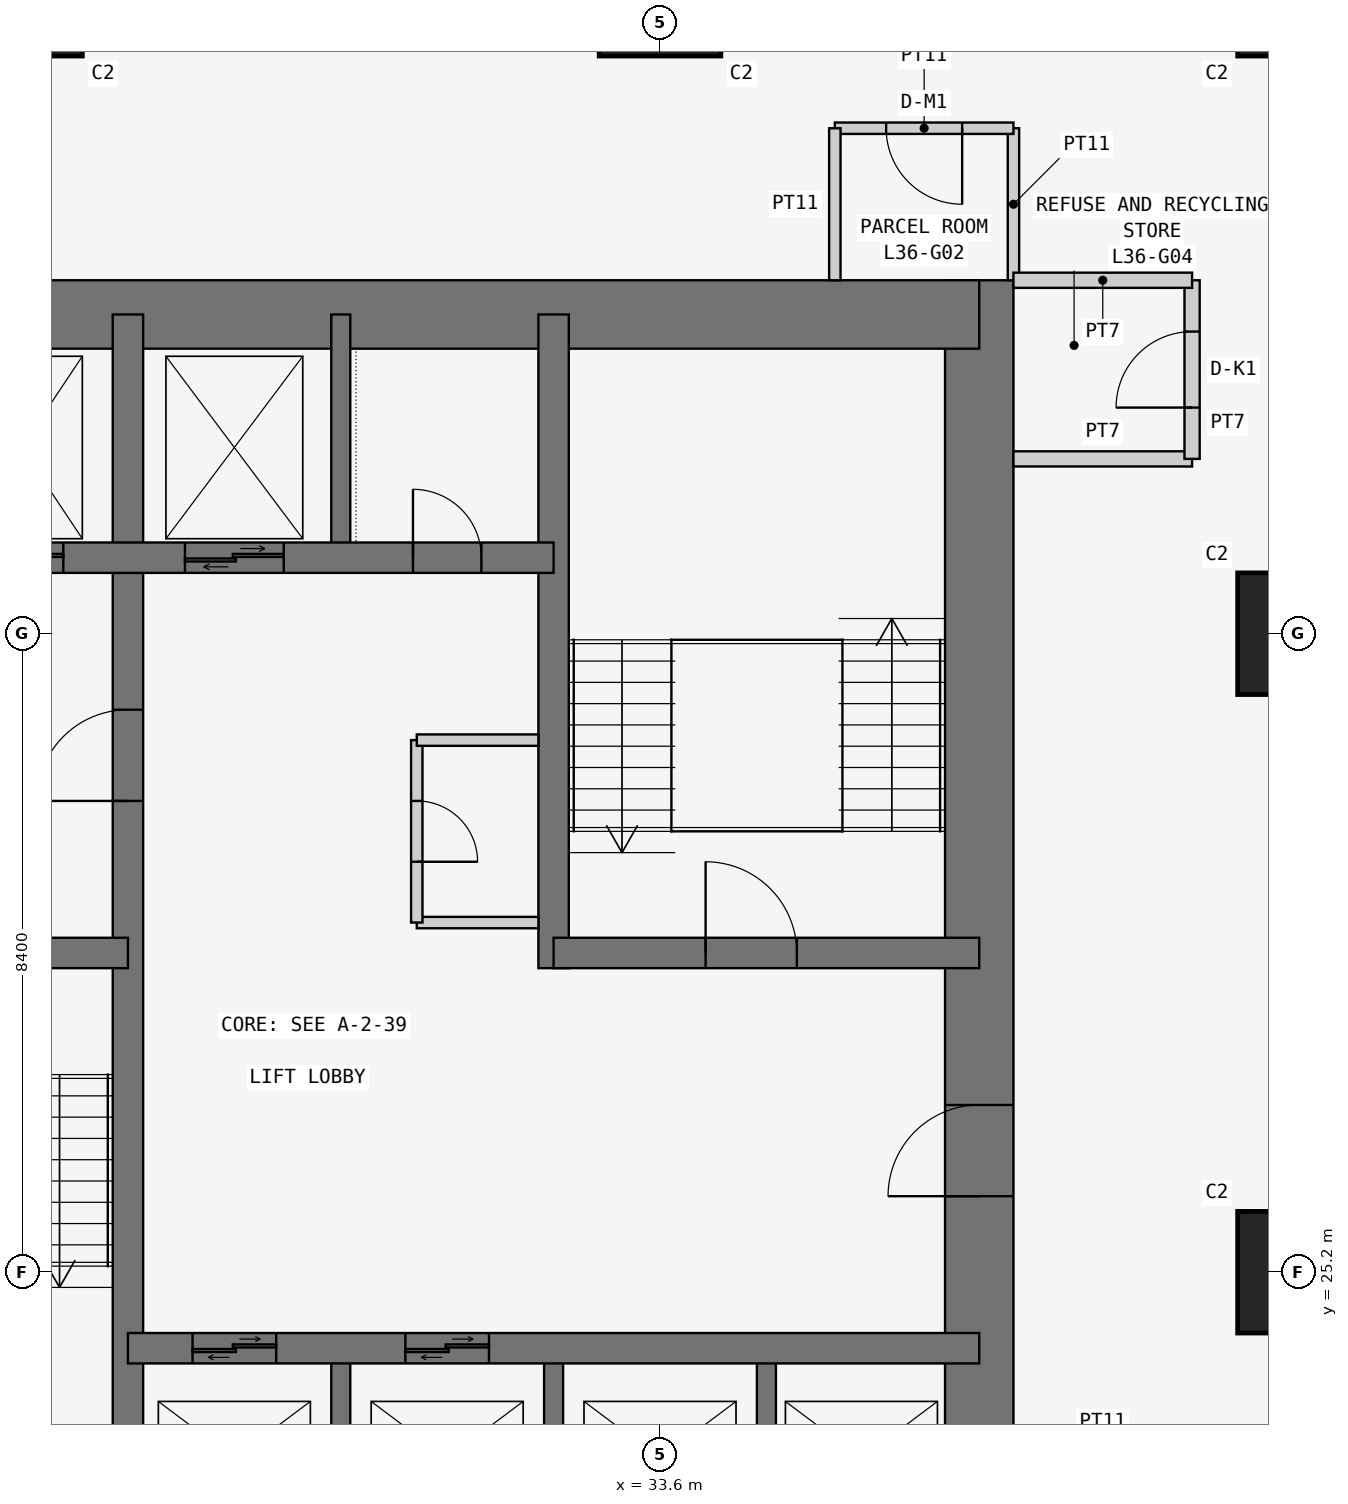
"""IFC4 building model, lengths in metres.
Left out: names, types, materials, properties, quantities, classifications, styles, units other than length and angle.
Written with IfcOpenShell. Run it as: python <this file> out.ifc"""

import sys

from ifc_helpers import new_model, si_unit, direction, frame, frame_2d, origin, origin_2d, place, context, subcontext, project, spatial, rectangle, extrude, element, fill, save


model = new_model("IFC4")
c1 = context("Model", 3, precision=1e-05, world=origin(), true_north=direction((0.0, 1.0)))
c2 = subcontext(c1, "Body", "Model", "MODEL_VIEW")
j1 = project(units=[si_unit("LENGTHUNIT", "METRE"), si_unit("PLANEANGLEUNIT", "RADIAN")], contexts=[c1])
p1 = place(None, origin())
s1 = spatial("IfcSite", under=j1, at=p1, CompositionType="ELEMENT")
p2 = place(p1, origin())
s2 = spatial("IfcBuilding", under=s1, at=p2, CompositionType="ELEMENT")
p3 = place(p2, frame((0.0, 0.0, 141.3)))
s3 = spatial("IfcBuildingStorey", under=s2, at=p3, CompositionType="ELEMENT", Elevation=141.3)
for number, where, z_axis, x_axis in (
    (1, (25.2, 42.0, 0.0), (0.0, 0.0, 1.0), (1.0, 0.0, 0.0)),
    (2, (33.6, 42.0, 0.0), (0.0, 0.0, 1.0), (1.0, 0.0, 0.0)),
    (3, (42.0, 25.2, 0.0), (0.0, 0.0, 1.0), (1.0, 0.0, 0.0)),
    (4, (42.0, 33.6, 0.0), (0.0, 0.0, 1.0), (1.0, 0.0, 0.0)),
    (5, (42.0, 42.0, 0.0), (0.0, 0.0, 1.0), (1.0, 0.0, 0.0)),
):
    element("IfcColumn", number, at=place(p3, frame(where, z_axis=z_axis, x_axis=x_axis)), inside=s3, PredefinedType="COLUMN", context=c2, shape_type="SweptSolid", body=[
        extrude(rectangle(XDim=1.6, YDim=1.6, at=origin_2d()), origin(), (0.0, 0.0, 1.0), 3.6),
    ])
p4 = place(p3, frame((37.8, 21.0, 0.0), z_axis=(0.0, 0.0, 1.0), x_axis=(0.0, 1.0, 0.0)))
e6 = element("IfcWall", 6, at=p4, inside=s3, PredefinedType="SHEAR", context=c2, shape_type="SweptSolid", body=[
    extrude(rectangle(XDim=17.25, YDim=0.9, at=frame_2d((8.625, 0.0))), origin(), (0.0, 0.0, 1.0), 3.6),
])
p5 = place(p4, frame((5.2, 0.0, 0.0)))
e7 = element("IfcOpeningElement", 7, at=p5, cuts=e6, PredefinedType="OPENING", context=c2, shape_type="SweptSolid", body=[
    extrude(rectangle(XDim=1.2, YDim=2.1, at=frame_2d((0.6, 1.05))), frame((0.0, 0.46, 0.0), z_axis=(0.0, -1.0, 0.0), x_axis=(1.0, 0.0, 0.0)), (0.0, 0.0, 1.0), 0.92),
])
p6 = place(p3, frame((37.8, 37.8, 0.0), z_axis=(0.0, 0.0, 1.0), x_axis=(-1.0, 0.0, 0.0)))
e8 = element("IfcWall", 8, at=p6, inside=s3, PredefinedType="SHEAR", context=c2, shape_type="SweptSolid", body=[
    extrude(rectangle(XDim=17.25, YDim=0.9, at=frame_2d((8.625, 0.0))), origin(), (0.0, 0.0, 1.0), 3.6),
])
p7 = place(p3, frame((26.6, 21.0, 0.0), z_axis=(0.0, 0.0, 1.0), x_axis=(0.0, 1.0, 0.0)))
e9 = element("IfcWall", 9, at=p7, inside=s3, PredefinedType="SHEAR", context=c2, shape_type="SweptSolid", body=[
    extrude(rectangle(XDim=16.8, YDim=0.4, at=frame_2d((8.4, 0.0))), origin(), (0.0, 0.0, 1.0), 3.6),
])
p8 = place(p7, frame((10.4, 0.0, 0.0)))
e10 = element("IfcOpeningElement", 10, at=p8, cuts=e9, PredefinedType="OPENING", context=c2, shape_type="SweptSolid", body=[
    extrude(rectangle(XDim=1.2, YDim=2.1, at=frame_2d((0.6, 1.05))), frame((0.0, 0.21, 0.0), z_axis=(0.0, -1.0, 0.0), x_axis=(1.0, 0.0, 0.0)), (0.0, 0.0, 1.0), 0.42),
])
p9 = place(p3, frame((21.0, 29.4, 0.0), z_axis=(0.0, 0.0, 1.0), x_axis=(1.0, 0.0, 0.0)))
e11 = element("IfcWall", 11, at=p9, inside=s3, PredefinedType="SHEAR", context=c2, shape_type="SweptSolid", body=[
    extrude(rectangle(XDim=5.6, YDim=0.4, at=frame_2d((2.8, 0.0))), origin(), (0.0, 0.0, 1.0), 3.6),
])
p10 = place(p9, frame((2.3, 0.0, 0.0)))
e12 = element("IfcOpeningElement", 12, at=p10, cuts=e11, PredefinedType="OPENING", context=c2, shape_type="SweptSolid", body=[
    extrude(rectangle(XDim=1.2, YDim=2.1, at=frame_2d((0.6, 1.05))), frame((0.0, 0.21, 0.0), z_axis=(0.0, -1.0, 0.0), x_axis=(1.0, 0.0, 0.0)), (0.0, 0.0, 1.0), 0.42),
])
p11 = place(p3, frame((21.0, 34.6, 0.0), z_axis=(0.0, 0.0, 1.0), x_axis=(1.0, 0.0, 0.0)))
e13 = element("IfcWall", 13, at=p11, inside=s3, PredefinedType="SHEAR", context=c2, shape_type="SweptSolid", body=[
    extrude(rectangle(XDim=11.2, YDim=0.4, at=frame_2d((5.6, 0.0))), origin(), (0.0, 0.0, 1.0), 3.6),
])
p12 = place(p11, frame((9.35, 0.0, 0.0)))
e14 = element("IfcOpeningElement", 14, at=p12, cuts=e13, PredefinedType="OPENING", context=c2, shape_type="SweptSolid", body=[
    extrude(rectangle(XDim=0.9, YDim=2.1, at=frame_2d((0.45, 1.05))), frame((0.0, 0.21, 0.0), z_axis=(0.0, -1.0, 0.0), x_axis=(1.0, 0.0, 0.0)), (0.0, 0.0, 1.0), 0.42),
])
p13 = place(p11, frame((1.0, 0.0, 0.0)))
e15 = element("IfcOpeningElement", 15, at=p13, cuts=e13, PredefinedType="OPENING", context=c2, shape_type="SweptSolid", body=[
    extrude(rectangle(XDim=1.1, YDim=2.1, at=frame_2d((0.55, 1.05))), frame((0.0, 0.21, 0.0), z_axis=(0.0, -1.0, 0.0), x_axis=(1.0, 0.0, 0.0)), (0.0, 0.0, 1.0), 0.42),
])
p14 = place(p11, frame((3.65, 0.0, 0.0)))
e16 = element("IfcOpeningElement", 16, at=p14, cuts=e13, PredefinedType="OPENING", context=c2, shape_type="SweptSolid", body=[
    extrude(rectangle(XDim=1.1, YDim=2.1, at=frame_2d((0.55, 1.05))), frame((0.0, 0.21, 0.0), z_axis=(0.0, -1.0, 0.0), x_axis=(1.0, 0.0, 0.0)), (0.0, 0.0, 1.0), 0.42),
])
p15 = place(p11, frame((6.35, 0.0, 0.0)))
e17 = element("IfcOpeningElement", 17, at=p15, cuts=e13, PredefinedType="OPENING", context=c2, shape_type="SweptSolid", body=[
    extrude(rectangle(XDim=1.3, YDim=2.1, at=frame_2d((0.65, 1.05))), frame((0.0, 0.21, 0.0), z_axis=(0.0, -1.0, 0.0), x_axis=(1.0, 0.0, 0.0)), (0.0, 0.0, 1.0), 0.42),
])
p16 = place(p3, frame((26.6, 24.2, 0.0), z_axis=(0.0, 0.0, 1.0), x_axis=(1.0, 0.0, 0.0)))
e18 = element("IfcWall", 18, at=p16, inside=s3, PredefinedType="SHEAR", context=c2, shape_type="SweptSolid", body=[
    extrude(rectangle(XDim=11.2, YDim=0.4, at=frame_2d((5.6, 0.0))), origin(), (0.0, 0.0, 1.0), 3.6),
])
p17 = place(p16, frame((0.85, 0.0, 0.0)))
e19 = element("IfcOpeningElement", 19, at=p17, cuts=e18, PredefinedType="OPENING", context=c2, shape_type="SweptSolid", body=[
    extrude(rectangle(XDim=1.1, YDim=2.1, at=frame_2d((0.55, 1.05))), frame((0.0, 0.21, 0.0), z_axis=(0.0, -1.0, 0.0), x_axis=(1.0, 0.0, 0.0)), (0.0, 0.0, 1.0), 0.42),
])
p18 = place(p16, frame((3.65, 0.0, 0.0)))
e20 = element("IfcOpeningElement", 20, at=p18, cuts=e18, PredefinedType="OPENING", context=c2, shape_type="SweptSolid", body=[
    extrude(rectangle(XDim=1.1, YDim=2.1, at=frame_2d((0.55, 1.05))), frame((0.0, 0.21, 0.0), z_axis=(0.0, -1.0, 0.0), x_axis=(1.0, 0.0, 0.0)), (0.0, 0.0, 1.0), 0.42),
])
p19 = place(p3, frame((32.2, 29.2, 0.0), z_axis=(0.0, 0.0, 1.0), x_axis=(0.0, 1.0, 0.0)))
e21 = element("IfcWall", 21, at=p19, inside=s3, PredefinedType="SHEAR", context=c2, shape_type="SweptSolid", body=[
    extrude(rectangle(XDim=8.6, YDim=0.4, at=frame_2d((4.3, 0.0))), origin(), (0.0, 0.0, 1.0), 3.6),
])
p20 = place(p3, frame((32.2, 29.4, 0.0), z_axis=(0.0, 0.0, 1.0), x_axis=(1.0, 0.0, 0.0)))
e22 = element("IfcWall", 22, at=p20, inside=s3, PredefinedType="SHEAR", context=c2, shape_type="SweptSolid", body=[
    extrude(rectangle(XDim=5.6, YDim=0.4, at=frame_2d((2.8, 0.0))), origin(), (0.0, 0.0, 1.0), 3.6),
])
p21 = place(p20, frame((2.0, 0.0, 0.0)))
e23 = element("IfcOpeningElement", 23, at=p21, cuts=e22, PredefinedType="OPENING", context=c2, shape_type="SweptSolid", body=[
    extrude(rectangle(XDim=1.2, YDim=2.1, at=frame_2d((0.6, 1.05))), frame((0.0, 0.21, 0.0), z_axis=(0.0, -1.0, 0.0), x_axis=(1.0, 0.0, 0.0)), (0.0, 0.0, 1.0), 0.42),
])
for number, where, z_axis, x_axis in (
    (24, (29.4, 21.0, 0.0), (0.0, 0.0, 1.0), (0.0, 1.0, 0.0)),
    (25, (32.2, 21.0, 0.0), (0.0, 0.0, 1.0), (0.0, 1.0, 0.0)),
    (26, (35.0, 21.0, 0.0), (0.0, 0.0, 1.0), (0.0, 1.0, 0.0)),
    (27, (29.4, 34.6, 0.0), (0.0, 0.0, 1.0), (0.0, 1.0, 0.0)),
):
    element("IfcWall", number, at=place(p3, frame(where, z_axis=z_axis, x_axis=x_axis)), inside=s3, PredefinedType="SHEAR", context=c2, shape_type="SweptSolid", body=[
        extrude(rectangle(XDim=3.2, YDim=0.25, at=frame_2d((1.6, 0.0))), origin(), (0.0, 0.0, 1.0), 3.6),
    ])
p22 = place(p3, frame((38.25, 38.25, 0.0), z_axis=(0.0, 0.0, 1.0), x_axis=(0.0, 1.0, 0.0)))
e28 = element("IfcWall", 28, at=p22, inside=s3, PredefinedType="PARTITIONING", context=c2, shape_type="SweptSolid", body=[
    extrude(rectangle(XDim=2.0, YDim=0.15, at=frame_2d((1.0, 0.0))), origin(), (0.0, 0.0, 1.0), 3.45),
])
p23 = place(p3, frame((38.25, 40.25, 0.0), z_axis=(0.0, 0.0, 1.0), x_axis=(-1.0, 0.0, 0.0)))
e29 = element("IfcWall", 29, at=p23, inside=s3, PredefinedType="PARTITIONING", context=c2, shape_type="SweptSolid", body=[
    extrude(rectangle(XDim=2.35, YDim=0.15, at=frame_2d((1.175, 0.0))), origin(), (0.0, 0.0, 1.0), 3.45),
])
p24 = place(p23, frame((0.675, 0.0, 0.0)))
e30 = element("IfcOpeningElement", 30, at=p24, cuts=e29, PredefinedType="OPENING", context=c2, shape_type="SweptSolid", body=[
    extrude(rectangle(XDim=1.0, YDim=2.1, at=frame_2d((0.5, 1.05))), frame((0.0, 0.085, 0.0), z_axis=(0.0, -1.0, 0.0), x_axis=(1.0, 0.0, 0.0)), (0.0, 0.0, 1.0), 0.17),
])
p25 = place(p3, frame((35.9, 40.25, 0.0), z_axis=(0.0, 0.0, 1.0), x_axis=(0.0, -1.0, 0.0)))
e31 = element("IfcWall", 31, at=p25, inside=s3, PredefinedType="PARTITIONING", context=c2, shape_type="SweptSolid", body=[
    extrude(rectangle(XDim=2.0, YDim=0.15, at=frame_2d((1.0, 0.0))), origin(), (0.0, 0.0, 1.0), 3.45),
])
p26 = place(p3, frame((38.25, 35.9, 0.0), z_axis=(0.0, 0.0, 1.0), x_axis=(1.0, 0.0, 0.0)))
e32 = element("IfcWall", 32, at=p26, inside=s3, PredefinedType="PARTITIONING", context=c2, shape_type="SweptSolid", body=[
    extrude(rectangle(XDim=2.35, YDim=0.2, at=frame_2d((1.175, 0.0))), origin(), (0.0, 0.0, 1.0), 3.45),
])
p27 = place(p3, frame((40.6, 35.9, 0.0), z_axis=(0.0, 0.0, 1.0), x_axis=(0.0, 1.0, 0.0)))
e33 = element("IfcWall", 33, at=p27, inside=s3, PredefinedType="PARTITIONING", context=c2, shape_type="SweptSolid", body=[
    extrude(rectangle(XDim=2.35, YDim=0.2, at=frame_2d((1.175, 0.0))), origin(), (0.0, 0.0, 1.0), 3.45),
])
p28 = place(p27, frame((0.675, 0.0, 0.0)))
e34 = element("IfcOpeningElement", 34, at=p28, cuts=e33, PredefinedType="OPENING", context=c2, shape_type="SweptSolid", body=[
    extrude(rectangle(XDim=1.0, YDim=2.1, at=frame_2d((0.5, 1.05))), frame((0.0, 0.11, 0.0), z_axis=(0.0, -1.0, 0.0), x_axis=(1.0, 0.0, 0.0)), (0.0, 0.0, 1.0), 0.22),
])
p29 = place(p3, frame((40.6, 38.25, 0.0), z_axis=(0.0, 0.0, 1.0), x_axis=(-1.0, 0.0, 0.0)))
e35 = element("IfcWall", 35, at=p29, inside=s3, PredefinedType="PARTITIONING", context=c2, shape_type="SweptSolid", body=[
    extrude(rectangle(XDim=2.35, YDim=0.2, at=frame_2d((1.175, 0.0))), origin(), (0.0, 0.0, 1.0), 3.45),
])
p30 = place(p3, frame((32.0, 29.8, 0.0), z_axis=(0.0, 0.0, 1.0), x_axis=(-1.0, 0.0, 0.0)))
e36 = element("IfcWall", 36, at=p30, inside=s3, PredefinedType="PARTITIONING", context=c2, shape_type="SweptSolid", body=[
    extrude(rectangle(XDim=1.6, YDim=0.15, at=frame_2d((0.8, 0.0))), origin(), (0.0, 0.0, 1.0), 3.45),
])
p31 = place(p3, frame((30.4, 29.8, 0.0), z_axis=(0.0, 0.0, 1.0), x_axis=(0.0, 1.0, 0.0)))
e37 = element("IfcWall", 37, at=p31, inside=s3, PredefinedType="PARTITIONING", context=c2, shape_type="SweptSolid", body=[
    extrude(rectangle(XDim=2.4, YDim=0.15, at=frame_2d((1.2, 0.0))), origin(), (0.0, 0.0, 1.0), 3.45),
])
p32 = place(p31, frame((0.8, 0.0, 0.0)))
e38 = element("IfcOpeningElement", 38, at=p32, cuts=e37, PredefinedType="OPENING", context=c2, shape_type="SweptSolid", body=[
    extrude(rectangle(XDim=0.8, YDim=2.1, at=frame_2d((0.4, 1.05))), frame((0.0, 0.085, 0.0), z_axis=(0.0, -1.0, 0.0), x_axis=(1.0, 0.0, 0.0)), (0.0, 0.0, 1.0), 0.17),
])
p33 = place(p3, frame((30.4, 32.2, 0.0), z_axis=(0.0, 0.0, 1.0), x_axis=(1.0, 0.0, 0.0)))
e39 = element("IfcWall", 39, at=p33, inside=s3, PredefinedType="PARTITIONING", context=c2, shape_type="SweptSolid", body=[
    extrude(rectangle(XDim=1.6, YDim=0.15, at=frame_2d((0.8, 0.0))), origin(), (0.0, 0.0, 1.0), 3.45),
])
p34 = place(p24, origin())
e40 = element("IfcDoor", 40, at=p34, inside=s3, OperationType="SINGLE_SWING_LEFT", PredefinedType="DOOR", context=c2, shape_type="SweptSolid", body=[
    extrude(rectangle(XDim=1.0, YDim=2.1, at=frame_2d((0.5, 1.05))), frame((0.0, 0.025, 0.0), z_axis=(0.0, -1.0, 0.0), x_axis=(1.0, 0.0, 0.0)), (0.0, 0.0, 1.0), 0.05),
])
fill(e30, e40)
p35 = place(p28, origin())
e41 = element("IfcDoor", 41, at=p35, inside=s3, OperationType="SINGLE_SWING_LEFT", PredefinedType="DOOR", context=c2, shape_type="SweptSolid", body=[
    extrude(rectangle(XDim=1.0, YDim=2.1, at=frame_2d((0.5, 1.05))), frame((0.0, 0.025, 0.0), z_axis=(0.0, -1.0, 0.0), x_axis=(1.0, 0.0, 0.0)), (0.0, 0.0, 1.0), 0.05),
])
fill(e34, e41)
p36 = place(p8, origin())
e42 = element("IfcDoor", 42, at=p36, inside=s3, OperationType="SINGLE_SWING_LEFT", PredefinedType="DOOR", context=c2, shape_type="SweptSolid", body=[
    extrude(rectangle(XDim=1.2, YDim=2.1, at=frame_2d((0.6, 1.05))), frame((0.0, 0.025, 0.0), z_axis=(0.0, -1.0, 0.0), x_axis=(1.0, 0.0, 0.0)), (0.0, 0.0, 1.0), 0.05),
])
fill(e10, e42)
p37 = place(p5, origin())
e43 = element("IfcDoor", 43, at=p37, inside=s3, OperationType="SINGLE_SWING_LEFT", PredefinedType="DOOR", context=c2, shape_type="SweptSolid", body=[
    extrude(rectangle(XDim=1.2, YDim=2.1, at=frame_2d((0.6, 1.05))), frame((0.0, 0.025, 0.0), z_axis=(0.0, -1.0, 0.0), x_axis=(1.0, 0.0, 0.0)), (0.0, 0.0, 1.0), 0.05),
])
fill(e7, e43)
p38 = place(p21, origin())
e44 = element("IfcDoor", 44, at=p38, inside=s3, OperationType="SINGLE_SWING_LEFT", PredefinedType="DOOR", context=c2, shape_type="SweptSolid", body=[
    extrude(rectangle(XDim=1.2, YDim=2.1, at=frame_2d((0.6, 1.05))), frame((0.0, 0.025, 0.0), z_axis=(0.0, -1.0, 0.0), x_axis=(1.0, 0.0, 0.0)), (0.0, 0.0, 1.0), 0.05),
])
fill(e23, e44)
p39 = place(p12, origin())
e45 = element("IfcDoor", 45, at=p39, inside=s3, OperationType="SINGLE_SWING_LEFT", PredefinedType="DOOR", context=c2, shape_type="SweptSolid", body=[
    extrude(rectangle(XDim=0.9, YDim=2.1, at=frame_2d((0.45, 1.05))), frame((0.0, 0.025, 0.0), z_axis=(0.0, -1.0, 0.0), x_axis=(1.0, 0.0, 0.0)), (0.0, 0.0, 1.0), 0.05),
])
fill(e14, e45)
p40 = place(p32, frame((0.8, 0.0, 0.0), z_axis=(0.0, 0.0, 1.0), x_axis=(-1.0, 0.0, 0.0)))
e46 = element("IfcDoor", 46, at=p40, inside=s3, OperationType="SINGLE_SWING_RIGHT", PredefinedType="DOOR", context=c2, shape_type="SweptSolid", body=[
    extrude(rectangle(XDim=0.8, YDim=2.1, at=frame_2d((0.4, 1.05))), frame((0.0, 0.025, 0.0), z_axis=(0.0, -1.0, 0.0), x_axis=(1.0, 0.0, 0.0)), (0.0, 0.0, 1.0), 0.05),
])
fill(e38, e46)
p41 = place(p17, origin())
e47 = element("IfcDoor", 47, at=p41, inside=s3, OperationType="DOUBLE_DOOR_SLIDING", PredefinedType="DOOR", context=c2, shape_type="SweptSolid", body=[
    extrude(rectangle(XDim=1.1, YDim=2.1, at=frame_2d((0.55, 1.05))), frame((0.0, 0.025, 0.0), z_axis=(0.0, -1.0, 0.0), x_axis=(1.0, 0.0, 0.0)), (0.0, 0.0, 1.0), 0.05),
])
fill(e19, e47)
p42 = place(p18, origin())
e48 = element("IfcDoor", 48, at=p42, inside=s3, OperationType="DOUBLE_DOOR_SLIDING", PredefinedType="DOOR", context=c2, shape_type="SweptSolid", body=[
    extrude(rectangle(XDim=1.1, YDim=2.1, at=frame_2d((0.55, 1.05))), frame((0.0, 0.025, 0.0), z_axis=(0.0, -1.0, 0.0), x_axis=(1.0, 0.0, 0.0)), (0.0, 0.0, 1.0), 0.05),
])
fill(e20, e48)
p43 = place(p14, origin())
e49 = element("IfcDoor", 49, at=p43, inside=s3, OperationType="DOUBLE_DOOR_SLIDING", PredefinedType="DOOR", context=c2, shape_type="SweptSolid", body=[
    extrude(rectangle(XDim=1.1, YDim=2.1, at=frame_2d((0.55, 1.05))), frame((0.0, 0.025, 0.0), z_axis=(0.0, -1.0, 0.0), x_axis=(1.0, 0.0, 0.0)), (0.0, 0.0, 1.0), 0.05),
])
fill(e16, e49)
p44 = place(p15, origin())
e50 = element("IfcDoor", 50, at=p44, inside=s3, OperationType="DOUBLE_DOOR_SLIDING", PredefinedType="DOOR", context=c2, shape_type="SweptSolid", body=[
    extrude(rectangle(XDim=1.3, YDim=2.1, at=frame_2d((0.65, 1.05))), frame((0.0, 0.025, 0.0), z_axis=(0.0, -1.0, 0.0), x_axis=(1.0, 0.0, 0.0)), (0.0, 0.0, 1.0), 0.05),
])
fill(e17, e50)
save(model, sys.argv[1])
